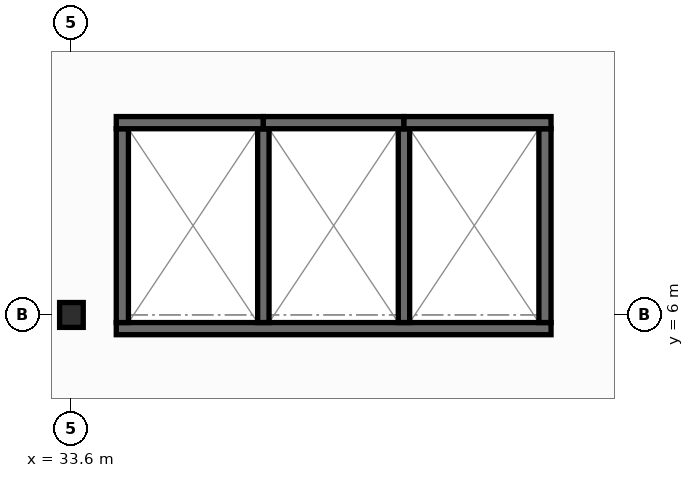
"""IFC4 building model, lengths in metres.
Left out: names, types, materials, properties, quantities, classifications, styles, units other than length and angle.
Written with IfcOpenShell. Run it as: python <this file> out.ifc"""

import sys

from ifc_helpers import new_model, si_unit, direction, frame, frame_2d, origin, origin_2d, place, context, subcontext, project, spatial, rectangle, i_section, extrude, element, save


model = new_model("IFC4")
c1 = context("Model", 3, precision=1e-05, world=origin(), true_north=direction((0.0, 1.0)))
c2 = subcontext(c1, "Body", "Model", "MODEL_VIEW")
j1 = project(units=[si_unit("LENGTHUNIT", "METRE"), si_unit("PLANEANGLEUNIT", "RADIAN")], contexts=[c1])
p1 = place(None, origin())
s1 = spatial("IfcSite", under=j1, at=p1, CompositionType="ELEMENT")
p2 = place(p1, origin())
s2 = spatial("IfcBuilding", under=s1, at=p2, CompositionType="ELEMENT")
p3 = place(p2, frame((0.0, 0.0, 85.7)))
s3 = spatial("IfcBuildingStorey", under=s2, at=p3, CompositionType="ELEMENT", Elevation=85.7)
p4 = place(p3, frame((33.6, 6.0, 0.0), z_axis=(0.0, 0.0, 1.0), x_axis=(1.0, 0.0, 0.0)))
e1 = element("IfcColumn", 1, at=p4, inside=s3, PredefinedType="COLUMN", context=c2, shape_type="SweptSolid", body=[
    extrude(i_section(OverallWidth=0.311, OverallDepth=0.327, WebThickness=0.016, FlangeThickness=0.025, FilletRadius=0.017, at=origin_2d()), origin(), (0.0, 0.0, 1.0), 3.95),
])
p5 = place(p3, frame((34.19, 5.82, 0.0), z_axis=(0.0, 0.0, 1.0), x_axis=(1.0, 0.0, 0.0)))
e2 = element("IfcWall", 2, at=p5, inside=s3, PredefinedType="SHEAR", context=c2, shape_type="SweptSolid", body=[
    extrude(rectangle(XDim=5.72, YDim=0.16, at=frame_2d((2.86, 0.0))), origin(), (0.0, 0.0, 1.0), 3.71),
])
for number, where, z_axis, x_axis in (
    (3, (34.27, 5.9, 0.0), (0.0, 0.0, 1.0), (0.0, 1.0, 0.0)),
    (4, (39.83, 5.9, 0.0), (0.0, 0.0, 1.0), (0.0, 1.0, 0.0)),
):
    element("IfcWall", number, at=place(p3, frame(where, z_axis=z_axis, x_axis=x_axis)), inside=s3, PredefinedType="SHEAR", context=c2, shape_type="SweptSolid", body=[
        extrude(rectangle(XDim=2.55, YDim=0.16, at=frame_2d((1.275, 0.0))), origin(), (0.0, 0.0, 1.0), 3.71),
    ])
for number, where, z_axis, x_axis in (
    (5, (36.125, 5.9, 0.0), (0.0, 0.0, 1.0), (0.0, 1.0, 0.0)),
    (6, (37.975, 5.9, 0.0), (0.0, 0.0, 1.0), (0.0, 1.0, 0.0)),
):
    element("IfcWall", number, at=place(p3, frame(where, z_axis=z_axis, x_axis=x_axis)), inside=s3, PredefinedType="SHEAR", context=c2, shape_type="SweptSolid", body=[
        extrude(rectangle(XDim=2.55, YDim=0.15, at=frame_2d((1.275, 0.0))), origin(), (0.0, 0.0, 1.0), 3.71),
    ])
p6 = place(p3, frame((34.19, 8.53, 0.0), z_axis=(0.0, 0.0, 1.0), x_axis=(1.0, 0.0, 0.0)))
e7 = element("IfcWall", 7, at=p6, inside=s3, PredefinedType="SHEAR", context=c2, shape_type="SweptSolid", body=[
    extrude(rectangle(XDim=1.935, YDim=0.16, at=frame_2d((0.968, 0.0))), origin(), (0.0, 0.0, 1.0), 3.71),
])
p7 = place(p3, frame((36.125, 8.53, 0.0), z_axis=(0.0, 0.0, 1.0), x_axis=(1.0, 0.0, 0.0)))
e8 = element("IfcWall", 8, at=p7, inside=s3, PredefinedType="SHEAR", context=c2, shape_type="SweptSolid", body=[
    extrude(rectangle(XDim=1.85, YDim=0.16, at=frame_2d((0.925, 0.0))), origin(), (0.0, 0.0, 1.0), 3.71),
])
p8 = place(p3, frame((37.975, 8.53, 0.0), z_axis=(0.0, 0.0, 1.0), x_axis=(1.0, 0.0, 0.0)))
e9 = element("IfcWall", 9, at=p8, inside=s3, PredefinedType="SHEAR", context=c2, shape_type="SweptSolid", body=[
    extrude(rectangle(XDim=1.935, YDim=0.16, at=frame_2d((0.967, 0.0))), origin(), (0.0, 0.0, 1.0), 3.71),
])
save(model, sys.argv[1])
